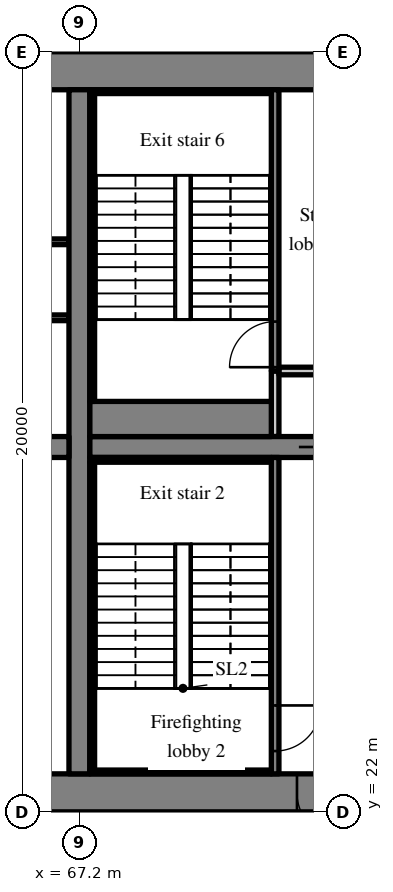
"""IFC4 building model, lengths in metres.
Left out: names, types, materials, properties, quantities, classifications, styles, units other than length and angle.
Written with IfcOpenShell. Run it as: python <this file> out.ifc"""

import sys

from ifc_helpers import new_model, si_unit, direction, frame, frame_2d, origin, place, context, subcontext, project, spatial, rectangle, extrude, source, transform, mapped, element, fill, save


model = new_model("IFC4")
c1 = context("Model", 3, precision=1e-05, world=origin(), true_north=direction((0.0, 1.0)))
c2 = subcontext(c1, "Body", "Model", "MODEL_VIEW")
j1 = project(units=[si_unit("LENGTHUNIT", "METRE"), si_unit("PLANEANGLEUNIT", "RADIAN")], contexts=[c1])
p1 = place(None, origin())
s1 = spatial("IfcSite", under=j1, at=p1, CompositionType="ELEMENT")
p2 = place(p1, origin())
s2 = spatial("IfcBuilding", under=s1, at=p2, CompositionType="ELEMENT")
p3 = place(p2, frame((0.0, 0.0, 73.4)))
s3 = spatial("IfcBuildingStorey", under=s2, at=p3, CompositionType="ELEMENT", Elevation=73.4)
m1 = source(origin(), c2, "Body", "SweptSolid", [
    extrude(rectangle(XDim=50.4, YDim=1.0, at=frame_2d((25.2, 0.0))), origin(), (0.0, 0.0, 1.0), 3.52),
])
p4 = place(p3, frame((25.2, 22.5, 0.0), z_axis=(0.0, 0.0, 1.0), x_axis=(1.0, 0.0, 0.0)))
e1 = element("IfcWall", 1, at=p4, inside=s3, PredefinedType="SHEAR", context=c2, shape_type="MappedRepresentation", body=[
    mapped(m1, transform((0.0, 0.0, 0.0), scale=1.0)),
])
m2 = source(origin(), c2, "Body", "SweptSolid", [
    extrude(rectangle(XDim=1.8, YDim=2.1, at=frame_2d((0.9, 1.05))), frame((0.0, 0.51, 0.0), z_axis=(0.0, -1.0, 0.0), x_axis=(1.0, 0.0, 0.0)), (0.0, 0.0, 1.0), 1.02),
])
p5 = place(p4, frame((15.9, 0.0, 0.0)))
e2 = element("IfcOpeningElement", 2, at=p5, cuts=e1, PredefinedType="OPENING", context=c2, shape_type="MappedRepresentation", body=[
    mapped(m2, transform((0.0, 0.0, 0.0), scale=1.0)),
])
m3 = source(origin(), c2, "Body", "SweptSolid", [
    extrude(rectangle(XDim=1.2, YDim=2.1, at=frame_2d((0.6, 1.05))), frame((0.0, 0.51, 0.0), z_axis=(0.0, -1.0, 0.0), x_axis=(1.0, 0.0, 0.0)), (0.0, 0.0, 1.0), 1.02),
])
p6 = place(p4, frame((26.987, 0.0, 0.0)))
e3 = element("IfcOpeningElement", 3, at=p6, cuts=e1, PredefinedType="OPENING", context=c2, shape_type="MappedRepresentation", body=[
    mapped(m3, transform((0.0, 0.0, 0.0), scale=1.0)),
])
m4 = source(origin(), c2, "Body", "SweptSolid", [
    extrude(rectangle(XDim=0.9, YDim=2.1, at=frame_2d((0.45, 1.05))), frame((0.0, 0.51, 0.0), z_axis=(0.0, -1.0, 0.0), x_axis=(1.0, 0.0, 0.0)), (0.0, 0.0, 1.0), 1.02),
])
p7 = place(p4, frame((32.25, 0.0, 0.0)))
e4 = element("IfcOpeningElement", 4, at=p7, cuts=e1, PredefinedType="OPENING", context=c2, shape_type="MappedRepresentation", body=[
    mapped(m4, transform((0.0, 0.0, 0.0), scale=1.0)),
])
p8 = place(p4, frame((38.262, 0.0, 0.0)))
e5 = element("IfcOpeningElement", 5, at=p8, cuts=e1, PredefinedType="OPENING", context=c2, shape_type="MappedRepresentation", body=[
    mapped(m4, transform((0.0, 0.0, 0.0), scale=1.0)),
])
p9 = place(p4, frame((6.438, 0.0, 0.0)))
e6 = element("IfcOpeningElement", 6, at=p9, cuts=e1, PredefinedType="OPENING", context=c2, shape_type="MappedRepresentation", body=[
    mapped(m3, transform((0.0, 0.0, 0.0), scale=1.0)),
])
p10 = place(p4, frame((47.725, 0.0, 0.0)))
e7 = element("IfcOpeningElement", 7, at=p10, cuts=e1, PredefinedType="OPENING", context=c2, shape_type="MappedRepresentation", body=[
    mapped(m3, transform((0.0, 0.0, 0.0), scale=1.0)),
])
p11 = place(p3, frame((25.2, 41.5, 0.0), z_axis=(0.0, 0.0, 1.0), x_axis=(1.0, 0.0, 0.0)))
e8 = element("IfcWall", 8, at=p11, inside=s3, PredefinedType="SHEAR", context=c2, shape_type="MappedRepresentation", body=[
    mapped(m1, transform((0.0, 0.0, 0.0), scale=1.0)),
])
m5 = source(origin(), c2, "Body", "SweptSolid", [
    extrude(rectangle(XDim=18.0, YDim=0.55, at=frame_2d((9.0, 0.0))), origin(), (0.0, 0.0, 1.0), 3.52),
])
p12 = place(p3, frame((67.2, 23.0, 0.0), z_axis=(0.0, 0.0, 1.0), x_axis=(0.0, 1.0, 0.0)))
e9 = element("IfcWall", 9, at=p12, inside=s3, PredefinedType="SHEAR", context=c2, shape_type="MappedRepresentation", body=[
    mapped(m5, transform((0.0, 0.0, 0.0), scale=1.0)),
])
m6 = source(origin(), c2, "Body", "SweptSolid", [
    extrude(rectangle(XDim=16.25, YDim=0.55, at=frame_2d((8.125, 0.0))), origin(), (0.0, 0.0, 1.0), 3.52),
])
p13 = place(p3, frame((50.675, 31.6, 0.0), z_axis=(0.0, 0.0, 1.0), x_axis=(1.0, 0.0, 0.0)))
e10 = element("IfcWall", 10, at=p13, inside=s3, PredefinedType="SHEAR", context=c2, shape_type="MappedRepresentation", body=[
    mapped(m6, transform((0.0, 0.0, 0.0), scale=1.0)),
])
m7 = source(origin(), c2, "Body", "SweptSolid", [
    extrude(rectangle(XDim=1.0, YDim=2.1, at=frame_2d((0.5, 1.05))), frame((0.0, 0.285, 0.0), z_axis=(0.0, -1.0, 0.0), x_axis=(1.0, 0.0, 0.0)), (0.0, 0.0, 1.0), 0.57),
])
p14 = place(p13, frame((0.562, 0.0, 0.0)))
e11 = element("IfcOpeningElement", 11, at=p14, cuts=e10, PredefinedType="OPENING", context=c2, shape_type="MappedRepresentation", body=[
    mapped(m7, transform((0.0, 0.0, 0.0), scale=1.0)),
])
m8 = source(origin(), c2, "Body", "SweptSolid", [
    extrude(rectangle(XDim=7.125, YDim=0.55, at=frame_2d((3.562, 0.0))), origin(), (0.0, 0.0, 1.0), 3.52),
])
p15 = place(p3, frame((67.475, 31.6, 0.0), z_axis=(0.0, 0.0, 1.0), x_axis=(1.0, 0.0, 0.0)))
e12 = element("IfcWall", 12, at=p15, inside=s3, PredefinedType="SHEAR", context=c2, shape_type="MappedRepresentation", body=[
    mapped(m8, transform((0.0, 0.0, 0.0), scale=1.0)),
])
m9 = source(origin(), c2, "Body", "SweptSolid", [
    extrude(rectangle(XDim=1.1, YDim=2.1, at=frame_2d((0.55, 1.05))), frame((0.0, 0.285, 0.0), z_axis=(0.0, -1.0, 0.0), x_axis=(1.0, 0.0, 0.0)), (0.0, 0.0, 1.0), 0.57),
])
p16 = place(p15, frame((5.5, 0.0, 0.0)))
e13 = element("IfcOpeningElement", 13, at=p16, cuts=e12, PredefinedType="OPENING", context=c2, shape_type="MappedRepresentation", body=[
    mapped(m9, transform((0.0, 0.0, 0.0), scale=1.0)),
])
m10 = source(origin(), c2, "Body", "SweptSolid", [
    extrude(rectangle(XDim=14.125, YDim=0.15, at=frame_2d((7.062, 0.0))), origin(), (0.0, 0.0, 1.0), 3.52),
])
p17 = place(p3, frame((66.925, 35.0, 0.0), z_axis=(0.0, 0.0, 1.0), x_axis=(-1.0, 0.0, 0.0)))
e14 = element("IfcWall", 14, at=p17, inside=s3, PredefinedType="PARTITIONING", context=c2, shape_type="MappedRepresentation", body=[
    mapped(m10, transform((0.0, 0.0, 0.0), scale=1.0)),
])
m11 = source(origin(), c2, "Body", "SweptSolid", [
    extrude(rectangle(XDim=0.9, YDim=2.1, at=frame_2d((0.45, 1.05))), frame((0.0, 0.085, 0.0), z_axis=(0.0, -1.0, 0.0), x_axis=(1.0, 0.0, 0.0)), (0.0, 0.0, 1.0), 0.17),
])
p18 = place(p17, frame((6.575, 0.0, 0.0)))
e15 = element("IfcOpeningElement", 15, at=p18, cuts=e14, PredefinedType="OPENING", context=c2, shape_type="MappedRepresentation", body=[
    mapped(m11, transform((0.0, 0.0, 0.0), scale=1.0)),
])
m12 = source(origin(), c2, "Body", "SweptSolid", [
    extrude(rectangle(XDim=16.25, YDim=0.15, at=frame_2d((8.125, 0.0))), origin(), (0.0, 0.0, 1.0), 3.52),
])
p19 = place(p3, frame((66.925, 37.0, 0.0), z_axis=(0.0, 0.0, 1.0), x_axis=(-1.0, 0.0, 0.0)))
e16 = element("IfcWall", 16, at=p19, inside=s3, PredefinedType="PARTITIONING", context=c2, shape_type="MappedRepresentation", body=[
    mapped(m12, transform((0.0, 0.0, 0.0), scale=1.0)),
])
p20 = place(p19, frame((3.206, 0.0, 0.0)))
e17 = element("IfcOpeningElement", 17, at=p20, cuts=e16, PredefinedType="OPENING", context=c2, shape_type="MappedRepresentation", body=[
    mapped(m11, transform((0.0, 0.0, 0.0), scale=1.0)),
])
p21 = place(p19, frame((8.081, 0.0, 0.0)))
e18 = element("IfcOpeningElement", 18, at=p21, cuts=e16, PredefinedType="OPENING", context=c2, shape_type="MappedRepresentation", body=[
    mapped(m11, transform((0.0, 0.0, 0.0), scale=1.0)),
])
p22 = place(p19, frame((11.331, 0.0, 0.0)))
e19 = element("IfcOpeningElement", 19, at=p22, cuts=e16, PredefinedType="OPENING", context=c2, shape_type="MappedRepresentation", body=[
    mapped(m11, transform((0.0, 0.0, 0.0), scale=1.0)),
])
p23 = place(p19, frame((14.581, 0.0, 0.0)))
e20 = element("IfcOpeningElement", 20, at=p23, cuts=e16, PredefinedType="OPENING", context=c2, shape_type="MappedRepresentation", body=[
    mapped(m11, transform((0.0, 0.0, 0.0), scale=1.0)),
])
m13 = source(origin(), c2, "Body", "SweptSolid", [
    extrude(rectangle(XDim=8.325, YDim=0.2, at=frame_2d((4.163, 0.0))), origin(), (0.0, 0.0, 1.0), 3.52),
])
p24 = place(p3, frame((72.35, 23.0, 0.0), z_axis=(0.0, 0.0, 1.0), x_axis=(0.0, 1.0, 0.0)))
e21 = element("IfcWall", 21, at=p24, inside=s3, PredefinedType="SOLIDWALL", context=c2, shape_type="MappedRepresentation", body=[
    mapped(m13, transform((0.0, 0.0, 0.0), scale=1.0)),
])
m14 = source(origin(), c2, "Body", "SweptSolid", [
    extrude(rectangle(XDim=1.2, YDim=2.1, at=frame_2d((0.6, 1.05))), frame((0.0, 0.11, 0.0), z_axis=(0.0, -1.0, 0.0), x_axis=(1.0, 0.0, 0.0)), (0.0, 0.0, 1.0), 0.22),
])
p25 = place(p24, frame((0.6, 0.0, 0.0)))
e22 = element("IfcOpeningElement", 22, at=p25, cuts=e21, PredefinedType="OPENING", context=c2, shape_type="MappedRepresentation", body=[
    mapped(m14, transform((0.0, 0.0, 0.0), scale=1.0)),
])
m15 = source(origin(), c2, "Body", "SweptSolid", [
    extrude(rectangle(XDim=1.725, YDim=0.2, at=frame_2d((0.863, 0.0))), origin(), (0.0, 0.0, 1.0), 3.52),
])
p26 = place(p3, frame((72.35, 31.875, 0.0), z_axis=(0.0, 0.0, 1.0), x_axis=(0.0, 1.0, 0.0)))
e23 = element("IfcWall", 23, at=p26, inside=s3, PredefinedType="SOLIDWALL", context=c2, shape_type="MappedRepresentation", body=[
    mapped(m15, transform((0.0, 0.0, 0.0), scale=1.0)),
])
m16 = source(origin(), c2, "Body", "SweptSolid", [
    extrude(rectangle(XDim=2.15, YDim=0.2, at=frame_2d((1.075, 0.0))), origin(), (0.0, 0.0, 1.0), 3.52),
])
p27 = place(p3, frame((72.45, 33.6, 0.0), z_axis=(0.0, 0.0, 1.0), x_axis=(1.0, 0.0, 0.0)))
e24 = element("IfcWall", 24, at=p27, inside=s3, PredefinedType="SOLIDWALL", context=c2, shape_type="MappedRepresentation", body=[
    mapped(m16, transform((0.0, 0.0, 0.0), scale=1.0)),
])
m17 = source(origin(), c2, "Body", "SweptSolid", [
    extrude(rectangle(XDim=7.4, YDim=0.2, at=frame_2d((3.7, 0.0))), origin(), (0.0, 0.0, 1.0), 3.52),
])
p28 = place(p3, frame((72.35, 33.6, 0.0), z_axis=(0.0, 0.0, 1.0), x_axis=(0.0, 1.0, 0.0)))
e25 = element("IfcWall", 25, at=p28, inside=s3, PredefinedType="SOLIDWALL", context=c2, shape_type="MappedRepresentation", body=[
    mapped(m17, transform((0.0, 0.0, 0.0), scale=1.0)),
])
p29 = place(p28, frame((0.1, 0.0, 0.0)))
e26 = element("IfcOpeningElement", 26, at=p29, cuts=e25, PredefinedType="OPENING", context=c2, shape_type="MappedRepresentation", body=[
    mapped(m14, transform((0.0, 0.0, 0.0), scale=1.0)),
])
m18 = source(origin(), c2, "Body", "SweptSolid", [
    extrude(rectangle(XDim=4.775, YDim=0.1, at=frame_2d((2.387, 0.0))), origin(), (0.0, 0.0, 1.0), 3.52),
])
p30 = place(p3, frame((67.475, 23.05, 0.0), z_axis=(0.0, 0.0, 1.0), x_axis=(1.0, 0.0, 0.0)))
e27 = element("IfcWall", 27, at=p30, inside=s3, PredefinedType="SOLIDWALL", context=c2, shape_type="MappedRepresentation", body=[
    mapped(m18, transform((0.0, 0.0, 0.0), scale=1.0)),
])
m19 = source(origin(), c2, "Body", "SweptSolid", [
    extrude(rectangle(XDim=4.775, YDim=0.125, at=frame_2d((2.387, 0.0))), origin(), (0.0, 0.0, 1.0), 3.52),
])
p31 = place(p3, frame((67.475, 31.262, 0.0), z_axis=(0.0, 0.0, 1.0), x_axis=(1.0, 0.0, 0.0)))
e28 = element("IfcWall", 28, at=p31, inside=s3, PredefinedType="SOLIDWALL", context=c2, shape_type="MappedRepresentation", body=[
    mapped(m19, transform((0.0, 0.0, 0.0), scale=1.0)),
])
m20 = source(origin(), c2, "Body", "SweptSolid", [
    extrude(rectangle(XDim=8.1, YDim=0.125, at=frame_2d((4.05, 0.0))), origin(), (0.0, 0.0, 1.0), 3.52),
])
p32 = place(p3, frame((67.537, 23.1, 0.0), z_axis=(0.0, 0.0, 1.0), x_axis=(0.0, 1.0, 0.0)))
e29 = element("IfcWall", 29, at=p32, inside=s3, PredefinedType="SOLIDWALL", context=c2, shape_type="MappedRepresentation", body=[
    mapped(m20, transform((0.0, 0.0, 0.0), scale=1.0)),
])
p33 = place(p3, frame((67.475, 40.95, 0.0), z_axis=(0.0, 0.0, 1.0), x_axis=(1.0, 0.0, 0.0)))
e30 = element("IfcWall", 30, at=p33, inside=s3, PredefinedType="SOLIDWALL", context=c2, shape_type="MappedRepresentation", body=[
    mapped(m18, transform((0.0, 0.0, 0.0), scale=1.0)),
])
m21 = source(origin(), c2, "Body", "SweptSolid", [
    extrude(rectangle(XDim=4.775, YDim=0.925, at=frame_2d((2.387, 0.0))), origin(), (0.0, 0.0, 1.0), 3.52),
])
p34 = place(p3, frame((67.475, 32.337, 0.0), z_axis=(0.0, 0.0, 1.0), x_axis=(1.0, 0.0, 0.0)))
e31 = element("IfcWall", 31, at=p34, inside=s3, PredefinedType="SOLIDWALL", context=c2, shape_type="MappedRepresentation", body=[
    mapped(m21, transform((0.0, 0.0, 0.0), scale=1.0)),
])
p35 = place(p3, frame((67.537, 32.8, 0.0), z_axis=(0.0, 0.0, 1.0), x_axis=(0.0, 1.0, 0.0)))
e32 = element("IfcWall", 32, at=p35, inside=s3, PredefinedType="SOLIDWALL", context=c2, shape_type="MappedRepresentation", body=[
    mapped(m20, transform((0.0, 0.0, 0.0), scale=1.0)),
])
m22 = source(origin(), c2, "Body", "SweptSolid", [
    extrude(rectangle(XDim=1.2, YDim=2.1, at=frame_2d((0.6, 1.05))), frame((0.0, 0.025, 0.0), z_axis=(0.0, -1.0, 0.0), x_axis=(1.0, 0.0, 0.0)), (0.0, 0.0, 1.0), 0.05),
])
p36 = place(p25, origin())
e33 = element("IfcDoor", 33, at=p36, inside=s3, OperationType="SINGLE_SWING_RIGHT", PredefinedType="DOOR", context=c2, shape_type="MappedRepresentation", body=[
    mapped(m22, transform((0.0, 0.0, 0.0), scale=1.0)),
])
fill(e22, e33)
m23 = source(origin(), c2, "Body", "SweptSolid", [
    extrude(rectangle(XDim=1.2, YDim=2.1, at=frame_2d((0.6, 1.05))), frame((0.0, 0.375, 0.0), z_axis=(0.0, -1.0, 0.0), x_axis=(1.0, 0.0, 0.0)), (0.0, 0.0, 1.0), 0.05),
])
p37 = place(p10, origin())
e34 = element("IfcDoor", 34, at=p37, inside=s3, OperationType="SINGLE_SWING_RIGHT", PredefinedType="DOOR", context=c2, shape_type="MappedRepresentation", body=[
    mapped(m23, transform((0.0, 0.0, 0.0), scale=1.0)),
])
fill(e7, e34)
m24 = source(origin(), c2, "Body", "SweptSolid", [
    extrude(rectangle(XDim=1.1, YDim=2.1, at=frame_2d((0.55, 1.05))), frame((0.0, 0.025, 0.0), z_axis=(0.0, -1.0, 0.0), x_axis=(1.0, 0.0, 0.0)), (0.0, 0.0, 1.0), 0.05),
])
p38 = place(p16, origin())
e35 = element("IfcDoor", 35, at=p38, inside=s3, OperationType="SLIDING_TO_RIGHT", PredefinedType="DOOR", context=c2, shape_type="MappedRepresentation", body=[
    mapped(m24, transform((0.0, 0.0, 0.0), scale=1.0)),
])
fill(e13, e35)
p39 = place(p29, origin())
e36 = element("IfcDoor", 36, at=p39, inside=s3, OperationType="SINGLE_SWING_LEFT", PredefinedType="DOOR", context=c2, shape_type="MappedRepresentation", body=[
    mapped(m22, transform((0.0, 0.0, 0.0), scale=1.0)),
])
fill(e26, e36)
save(model, sys.argv[1])
